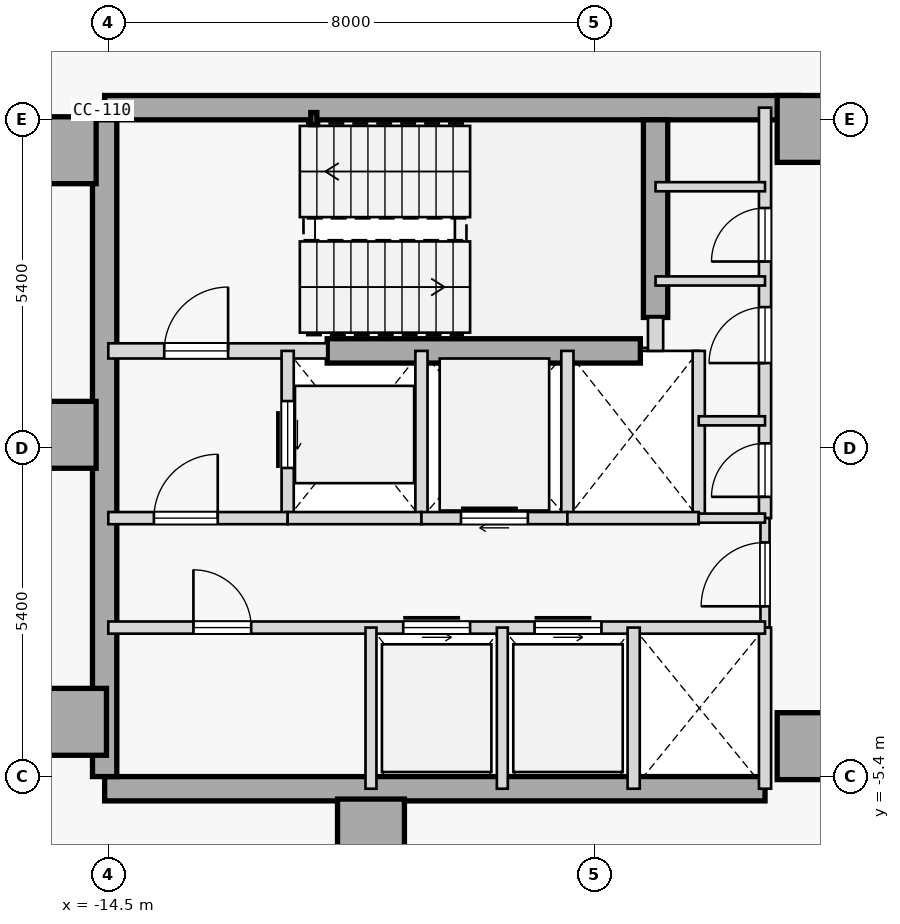
"""IFC4 building model, lengths in metres.
Left out: names, types, materials, properties, quantities, classifications, styles, units other than length and angle.
Written with IfcOpenShell. Run it as: python <this file> out.ifc"""

import sys

from ifc_helpers import new_model, si_unit, direction, frame, frame_2d, origin, origin_2d, place, context, subcontext, project, spatial, rectangle, hollow_rectangle, extrude, element, fill, save


model = new_model("IFC4")
c1 = context("Model", 3, precision=1e-05, world=origin(), true_north=direction((0.0, 1.0)))
c2 = subcontext(c1, "Body", "Model", "MODEL_VIEW")
j1 = project(units=[si_unit("LENGTHUNIT", "METRE"), si_unit("PLANEANGLEUNIT", "RADIAN")], contexts=[c1])
p1 = place(None, origin())
s1 = spatial("IfcSite", under=j1, at=p1, CompositionType="ELEMENT")
p2 = place(p1, origin())
s2 = spatial("IfcBuilding", under=s1, at=p2, CompositionType="ELEMENT")
p3 = place(p2, frame((0.0, 0.0, 87.4)))
s3 = spatial("IfcBuildingStorey", under=s2, at=p3, CompositionType="ELEMENT", Elevation=87.4)
for number, where, z_axis, x_axis in (
    (1, (-15.25, 4.9, 0.0), (0.0, 0.0, 1.0), (1.0, 0.0, 0.0)),
    (2, (-15.25, 0.22, 0.0), (0.0, 0.0, 1.0), (1.0, 0.0, 0.0)),
    (3, (-15.08, -4.5, 0.0), (0.0, 0.0, 1.0), (1.0, 0.0, 0.0)),
    (4, (-10.18, -6.32, 0.0), (0.0, 0.0, 1.0), (1.0, 0.0, 0.0)),
    (5, (-2.95, -4.9, 0.0), (0.0, 0.0, 1.0), (1.0, 0.0, 0.0)),
    (6, (-2.95, 5.25, 0.0), (0.0, 0.0, 1.0), (1.0, 0.0, 0.0)),
):
    element("IfcColumn", number, at=place(p3, frame(where, z_axis=z_axis, x_axis=x_axis)), inside=s3, PredefinedType="COLUMN", context=c2, shape_type="SweptSolid", body=[
        extrude(rectangle(XDim=1.1, YDim=1.1, at=origin_2d()), origin(), (0.0, 0.0, 1.0), 3.7),
    ])
p4 = place(p3, frame((-14.56, 5.6, 0.0), z_axis=(0.0, 0.0, 1.0), x_axis=(1.0, 0.0, 0.0)))
e7 = element("IfcWall", 7, at=p4, inside=s3, PredefinedType="SHEAR", context=c2, shape_type="SweptSolid", body=[
    extrude(rectangle(XDim=11.41, YDim=0.4, at=frame_2d((5.705, 0.0))), origin(), (0.0, 0.0, 1.0), 3.475),
])
p5 = place(p3, frame((-14.56, -5.6, 0.0), z_axis=(0.0, 0.0, 1.0), x_axis=(1.0, 0.0, 0.0)))
e8 = element("IfcWall", 8, at=p5, inside=s3, PredefinedType="SHEAR", context=c2, shape_type="SweptSolid", body=[
    extrude(rectangle(XDim=10.86, YDim=0.4, at=frame_2d((5.43, 0.0))), origin(), (0.0, 0.0, 1.0), 3.475),
])
p6 = place(p3, frame((-14.56, -5.4, 0.0), z_axis=(0.0, 0.0, 1.0), x_axis=(0.0, 1.0, 0.0)))
e9 = element("IfcWall", 9, at=p6, inside=s3, PredefinedType="SHEAR", context=c2, shape_type="SweptSolid", body=[
    extrude(rectangle(XDim=10.8, YDim=0.4, at=frame_2d((5.4, 0.0))), origin(), (0.0, 0.0, 1.0), 3.475),
])
p7 = place(p3, frame((-5.5, 2.15, 0.0), z_axis=(0.0, 0.0, 1.0), x_axis=(0.0, 1.0, 0.0)))
e10 = element("IfcWall", 10, at=p7, inside=s3, PredefinedType="SHEAR", context=c2, shape_type="SweptSolid", body=[
    extrude(rectangle(XDim=3.25, YDim=0.4, at=frame_2d((1.625, 0.0))), origin(), (0.0, 0.0, 1.0), 3.475),
])
p8 = place(p3, frame((-10.9, 1.6, 0.0), z_axis=(0.0, 0.0, 1.0), x_axis=(1.0, 0.0, 0.0)))
e11 = element("IfcWall", 11, at=p8, inside=s3, PredefinedType="SHEAR", context=c2, shape_type="SweptSolid", body=[
    extrude(rectangle(XDim=5.15, YDim=0.4, at=frame_2d((2.575, 0.0))), origin(), (0.0, 0.0, 1.0), 3.475),
])
p9 = place(p3, frame((-11.12, 5.42, 0.0), z_axis=(0.0, 0.0, 1.0), x_axis=(1.0, 0.0, 0.0)))
e12 = element("IfcColumn", 12, at=p9, inside=s3, PredefinedType="COLUMN", context=c2, shape_type="SweptSolid", body=[
    extrude(hollow_rectangle(XDim=0.1, YDim=0.2, WallThickness=0.008, at=origin_2d()), origin(), (0.0, 0.0, 1.0), 3.7),
])
p10 = place(p3, frame((-14.5, 1.6, 0.0), z_axis=(0.0, 0.0, 1.0), x_axis=(1.0, 0.0, 0.0)))
e13 = element("IfcWall", 13, at=p10, inside=s3, PredefinedType="STANDARD", context=c2, shape_type="SweptSolid", body=[
    extrude(rectangle(XDim=3.6, YDim=0.25, at=frame_2d((1.8, 0.0))), origin(), (0.0, 0.0, 1.0), 3.475),
])
p11 = place(p10, frame((0.92, 0.0, 0.0)))
e14 = element("IfcOpeningElement", 14, at=p11, cuts=e13, PredefinedType="OPENING", context=c2, shape_type="SweptSolid", body=[
    extrude(rectangle(XDim=1.05, YDim=2.15, at=frame_2d((0.525, 1.075))), frame((0.0, 0.135, 0.0), z_axis=(0.0, -1.0, 0.0), x_axis=(1.0, 0.0, 0.0)), (0.0, 0.0, 1.0), 0.27),
])
p12 = place(p3, frame((-5.5, 1.6, 0.0), z_axis=(0.0, 0.0, 1.0), x_axis=(0.0, 1.0, 0.0)))
e15 = element("IfcWall", 15, at=p12, inside=s3, PredefinedType="STANDARD", context=c2, shape_type="SweptSolid", body=[
    extrude(rectangle(XDim=0.55, YDim=0.25, at=frame_2d((0.275, 0.0))), origin(), (0.0, 0.0, 1.0), 3.475),
])
p13 = place(p3, frame((-3.7, -1.15, 0.0), z_axis=(0.0, 0.0, 1.0), x_axis=(0.0, 1.0, 0.0)))
e16 = element("IfcWall", 16, at=p13, inside=s3, PredefinedType="STANDARD", context=c2, shape_type="SweptSolid", body=[
    extrude(rectangle(XDim=6.75, YDim=0.2, at=frame_2d((3.375, 0.0))), origin(), (0.0, 0.0, 1.0), 3.475),
])
p14 = place(p13, frame((0.35, 0.0, 0.0)))
e17 = element("IfcOpeningElement", 17, at=p14, cuts=e16, PredefinedType="OPENING", context=c2, shape_type="SweptSolid", body=[
    extrude(rectangle(XDim=0.88, YDim=2.15, at=frame_2d((0.44, 1.075))), frame((0.0, 0.11, 0.0), z_axis=(0.0, -1.0, 0.0), x_axis=(1.0, 0.0, 0.0)), (0.0, 0.0, 1.0), 0.22),
])
p15 = place(p13, frame((2.55, 0.0, 0.0)))
e18 = element("IfcOpeningElement", 18, at=p15, cuts=e16, PredefinedType="OPENING", context=c2, shape_type="SweptSolid", body=[
    extrude(rectangle(XDim=0.92, YDim=2.15, at=frame_2d((0.46, 1.075))), frame((0.0, 0.11, 0.0), z_axis=(0.0, -1.0, 0.0), x_axis=(1.0, 0.0, 0.0)), (0.0, 0.0, 1.0), 0.22),
])
p16 = place(p13, frame((4.22, 0.0, 0.0)))
e19 = element("IfcOpeningElement", 19, at=p16, cuts=e16, PredefinedType="OPENING", context=c2, shape_type="SweptSolid", body=[
    extrude(rectangle(XDim=0.88, YDim=2.15, at=frame_2d((0.44, 1.075))), frame((0.0, 0.11, 0.0), z_axis=(0.0, -1.0, 0.0), x_axis=(1.0, 0.0, 0.0)), (0.0, 0.0, 1.0), 0.22),
])
p17 = place(p3, frame((-3.7, -2.95, 0.0), z_axis=(0.0, 0.0, 1.0), x_axis=(0.0, 1.0, 0.0)))
e20 = element("IfcWall", 20, at=p17, inside=s3, PredefinedType="PARTITIONING", context=c2, shape_type="SweptSolid", body=[
    extrude(rectangle(XDim=1.8, YDim=0.15, at=frame_2d((0.9, 0.0))), origin(), (0.0, 0.0, 1.0), 3.475),
])
p18 = place(p17, frame((0.35, 0.0, 0.0)))
e21 = element("IfcOpeningElement", 21, at=p18, cuts=e20, PredefinedType="OPENING", context=c2, shape_type="SweptSolid", body=[
    extrude(rectangle(XDim=1.05, YDim=2.18, at=frame_2d((0.525, 1.09))), frame((0.0, 0.085, 0.0), z_axis=(0.0, -1.0, 0.0), x_axis=(1.0, 0.0, 0.0)), (0.0, 0.0, 1.0), 0.17),
])
p19 = place(p3, frame((-3.7, -5.6, 0.0), z_axis=(0.0, 0.0, 1.0), x_axis=(0.0, 1.0, 0.0)))
e22 = element("IfcWall", 22, at=p19, inside=s3, PredefinedType="STANDARD", context=c2, shape_type="SweptSolid", body=[
    extrude(rectangle(XDim=2.65, YDim=0.2, at=frame_2d((1.325, 0.0))), origin(), (0.0, 0.0, 1.0), 3.475),
])
p20 = place(p3, frame((-11.55, -1.15, 0.0), z_axis=(0.0, 0.0, 1.0), x_axis=(0.0, 1.0, 0.0)))
e23 = element("IfcWall", 23, at=p20, inside=s3, PredefinedType="STANDARD", context=c2, shape_type="SweptSolid", body=[
    extrude(rectangle(XDim=2.75, YDim=0.2, at=frame_2d((1.375, 0.0))), origin(), (0.0, 0.0, 1.0), 3.475),
])
p21 = place(p20, frame((0.825, 0.0, 0.0)))
e24 = element("IfcOpeningElement", 24, at=p21, cuts=e23, PredefinedType="OPENING", context=c2, shape_type="SweptSolid", body=[
    extrude(rectangle(XDim=1.1, YDim=2.15, at=frame_2d((0.55, 1.075))), frame((0.0, 0.11, 0.0), z_axis=(0.0, -1.0, 0.0), x_axis=(1.0, 0.0, 0.0)), (0.0, 0.0, 1.0), 0.22),
])
p22 = place(p3, frame((-9.35, -1.15, 0.0), z_axis=(0.0, 0.0, 1.0), x_axis=(0.0, 1.0, 0.0)))
e25 = element("IfcWall", 25, at=p22, inside=s3, PredefinedType="STANDARD", context=c2, shape_type="SweptSolid", body=[
    extrude(rectangle(XDim=2.75, YDim=0.2, at=frame_2d((1.375, 0.0))), origin(), (0.0, 0.0, 1.0), 3.475),
])
p23 = place(p3, frame((-14.5, -1.15, 0.0), z_axis=(0.0, 0.0, 1.0), x_axis=(1.0, 0.0, 0.0)))
e26 = element("IfcWall", 26, at=p23, inside=s3, PredefinedType="STANDARD", context=c2, shape_type="SweptSolid", body=[
    extrude(rectangle(XDim=2.95, YDim=0.2, at=frame_2d((1.475, 0.0))), origin(), (0.0, 0.0, 1.0), 3.475),
])
p24 = place(p23, frame((0.75, 0.0, 0.0)))
e27 = element("IfcOpeningElement", 27, at=p24, cuts=e26, PredefinedType="OPENING", context=c2, shape_type="SweptSolid", body=[
    extrude(rectangle(XDim=1.05, YDim=2.18, at=frame_2d((0.525, 1.09))), frame((0.0, 0.11, 0.0), z_axis=(0.0, -1.0, 0.0), x_axis=(1.0, 0.0, 0.0)), (0.0, 0.0, 1.0), 0.22),
])
p25 = place(p3, frame((-11.55, -1.15, 0.0), z_axis=(0.0, 0.0, 1.0), x_axis=(1.0, 0.0, 0.0)))
e28 = element("IfcWall", 28, at=p25, inside=s3, PredefinedType="STANDARD", context=c2, shape_type="SweptSolid", body=[
    extrude(rectangle(XDim=2.2, YDim=0.2, at=frame_2d((1.1, 0.0))), origin(), (0.0, 0.0, 1.0), 3.475),
])
p26 = place(p3, frame((-6.95, -1.15, 0.0), z_axis=(0.0, 0.0, 1.0), x_axis=(0.0, 1.0, 0.0)))
e29 = element("IfcWall", 29, at=p26, inside=s3, PredefinedType="STANDARD", context=c2, shape_type="SweptSolid", body=[
    extrude(rectangle(XDim=2.75, YDim=0.2, at=frame_2d((1.375, 0.0))), origin(), (0.0, 0.0, 1.0), 3.475),
])
p27 = place(p3, frame((-9.35, -1.15, 0.0), z_axis=(0.0, 0.0, 1.0), x_axis=(1.0, 0.0, 0.0)))
e30 = element("IfcWall", 30, at=p27, inside=s3, PredefinedType="STANDARD", context=c2, shape_type="SweptSolid", body=[
    extrude(rectangle(XDim=2.4, YDim=0.2, at=frame_2d((1.2, 0.0))), origin(), (0.0, 0.0, 1.0), 3.475),
])
p28 = place(p27, frame((0.65, 0.0, 0.0)))
e31 = element("IfcOpeningElement", 31, at=p28, cuts=e30, PredefinedType="OPENING", context=c2, shape_type="SweptSolid", body=[
    extrude(rectangle(XDim=1.1, YDim=2.15, at=frame_2d((0.55, 1.075))), frame((0.0, 0.11, 0.0), z_axis=(0.0, -1.0, 0.0), x_axis=(1.0, 0.0, 0.0)), (0.0, 0.0, 1.0), 0.22),
])
p29 = place(p3, frame((-4.79, -1.15, 0.0), z_axis=(0.0, 0.0, 1.0), x_axis=(0.0, 1.0, 0.0)))
e32 = element("IfcWall", 32, at=p29, inside=s3, PredefinedType="STANDARD", context=c2, shape_type="SweptSolid", body=[
    extrude(rectangle(XDim=2.75, YDim=0.2, at=frame_2d((1.375, 0.0))), origin(), (0.0, 0.0, 1.0), 3.475),
])
p30 = place(p3, frame((-6.95, -1.15, 0.0), z_axis=(0.0, 0.0, 1.0), x_axis=(1.0, 0.0, 0.0)))
e33 = element("IfcWall", 33, at=p30, inside=s3, PredefinedType="STANDARD", context=c2, shape_type="SweptSolid", body=[
    extrude(rectangle(XDim=2.16, YDim=0.2, at=frame_2d((1.08, 0.0))), origin(), (0.0, 0.0, 1.0), 3.475),
])
p31 = place(p3, frame((-4.79, -1.15, 0.0), z_axis=(0.0, 0.0, 1.0), x_axis=(1.0, 0.0, 0.0)))
e34 = element("IfcWall", 34, at=p31, inside=s3, PredefinedType="PARTITIONING", context=c2, shape_type="SweptSolid", body=[
    extrude(rectangle(XDim=1.09, YDim=0.15, at=frame_2d((0.545, 0.0))), origin(), (0.0, 0.0, 1.0), 3.475),
])
p32 = place(p3, frame((-14.5, -2.95, 0.0), z_axis=(0.0, 0.0, 1.0), x_axis=(1.0, 0.0, 0.0)))
e35 = element("IfcWall", 35, at=p32, inside=s3, PredefinedType="STANDARD", context=c2, shape_type="SweptSolid", body=[
    extrude(rectangle(XDim=10.8, YDim=0.2, at=frame_2d((5.4, 0.0))), origin(), (0.0, 0.0, 1.0), 3.475),
])
p33 = place(p32, frame((4.85, 0.0, 0.0)))
e36 = element("IfcOpeningElement", 36, at=p33, cuts=e35, PredefinedType="OPENING", context=c2, shape_type="SweptSolid", body=[
    extrude(rectangle(XDim=1.1, YDim=2.15, at=frame_2d((0.55, 1.075))), frame((0.0, 0.11, 0.0), z_axis=(0.0, -1.0, 0.0), x_axis=(1.0, 0.0, 0.0)), (0.0, 0.0, 1.0), 0.22),
])
p34 = place(p32, frame((7.01, 0.0, 0.0)))
e37 = element("IfcOpeningElement", 37, at=p34, cuts=e35, PredefinedType="OPENING", context=c2, shape_type="SweptSolid", body=[
    extrude(rectangle(XDim=1.1, YDim=2.15, at=frame_2d((0.55, 1.075))), frame((0.0, 0.11, 0.0), z_axis=(0.0, -1.0, 0.0), x_axis=(1.0, 0.0, 0.0)), (0.0, 0.0, 1.0), 0.22),
])
p35 = place(p32, frame((1.4, 0.0, 0.0)))
e38 = element("IfcOpeningElement", 38, at=p35, cuts=e35, PredefinedType="OPENING", context=c2, shape_type="SweptSolid", body=[
    extrude(rectangle(XDim=0.95, YDim=2.15, at=frame_2d((0.475, 1.075))), frame((0.0, 0.11, 0.0), z_axis=(0.0, -1.0, 0.0), x_axis=(1.0, 0.0, 0.0)), (0.0, 0.0, 1.0), 0.22),
])
p36 = place(p3, frame((-5.86, -5.6, 0.0), z_axis=(0.0, 0.0, 1.0), x_axis=(0.0, 1.0, 0.0)))
e39 = element("IfcWall", 39, at=p36, inside=s3, PredefinedType="STANDARD", context=c2, shape_type="SweptSolid", body=[
    extrude(rectangle(XDim=2.65, YDim=0.2, at=frame_2d((1.325, 0.0))), origin(), (0.0, 0.0, 1.0), 3.475),
])
for number, where, z_axis, x_axis in (
    (40, (-10.18, -5.6, 0.0), (0.0, 0.0, 1.0), (0.0, 1.0, 0.0)),
    (41, (-8.02, -5.6, 0.0), (0.0, 0.0, 1.0), (0.0, 1.0, 0.0)),
):
    element("IfcWall", number, at=place(p3, frame(where, z_axis=z_axis, x_axis=x_axis)), inside=s3, PredefinedType="STANDARD", context=c2, shape_type="SweptSolid", body=[
        extrude(rectangle(XDim=2.65, YDim=0.18, at=frame_2d((1.325, 0.0))), origin(), (0.0, 0.0, 1.0), 3.475),
    ])
p37 = place(p3, frame((-5.5, 4.3, 0.0), z_axis=(0.0, 0.0, 1.0), x_axis=(1.0, 0.0, 0.0)))
e42 = element("IfcWall", 42, at=p37, inside=s3, PredefinedType="PARTITIONING", context=c2, shape_type="SweptSolid", body=[
    extrude(rectangle(XDim=1.8, YDim=0.15, at=frame_2d((0.9, 0.0))), origin(), (0.0, 0.0, 1.0), 3.475),
])
p38 = place(p3, frame((-4.79, 0.45, 0.0), z_axis=(0.0, 0.0, 1.0), x_axis=(1.0, 0.0, 0.0)))
e43 = element("IfcWall", 43, at=p38, inside=s3, PredefinedType="PARTITIONING", context=c2, shape_type="SweptSolid", body=[
    extrude(rectangle(XDim=1.09, YDim=0.15, at=frame_2d((0.545, 0.0))), origin(), (0.0, 0.0, 1.0), 3.475),
])
p39 = place(p3, frame((-5.5, 2.75, 0.0), z_axis=(0.0, 0.0, 1.0), x_axis=(1.0, 0.0, 0.0)))
e44 = element("IfcWall", 44, at=p39, inside=s3, PredefinedType="PARTITIONING", context=c2, shape_type="SweptSolid", body=[
    extrude(rectangle(XDim=1.8, YDim=0.15, at=frame_2d((0.9, 0.0))), origin(), (0.0, 0.0, 1.0), 3.475),
])
p40 = place(p11, origin())
e45 = element("IfcDoor", 45, at=p40, inside=s3, OperationType="SINGLE_SWING_RIGHT", PredefinedType="DOOR", context=c2, shape_type="SweptSolid", body=[
    extrude(rectangle(XDim=1.05, YDim=2.15, at=frame_2d((0.525, 1.075))), frame((0.0, 0.025, 0.0), z_axis=(0.0, -1.0, 0.0), x_axis=(1.0, 0.0, 0.0)), (0.0, 0.0, 1.0), 0.05),
])
fill(e14, e45)
p41 = place(p24, origin())
e46 = element("IfcDoor", 46, at=p41, inside=s3, OperationType="SINGLE_SWING_RIGHT", PredefinedType="DOOR", context=c2, shape_type="SweptSolid", body=[
    extrude(rectangle(XDim=1.05, YDim=2.18, at=frame_2d((0.525, 1.09))), frame((0.0, 0.025, 0.0), z_axis=(0.0, -1.0, 0.0), x_axis=(1.0, 0.0, 0.0)), (0.0, 0.0, 1.0), 0.05),
])
fill(e27, e46)
p42 = place(p18, origin())
e47 = element("IfcDoor", 47, at=p42, inside=s3, OperationType="SINGLE_SWING_LEFT", PredefinedType="DOOR", context=c2, shape_type="SweptSolid", body=[
    extrude(rectangle(XDim=1.05, YDim=2.18, at=frame_2d((0.525, 1.09))), frame((0.0, 0.025, 0.0), z_axis=(0.0, -1.0, 0.0), x_axis=(1.0, 0.0, 0.0)), (0.0, 0.0, 1.0), 0.05),
])
fill(e21, e47)
p43 = place(p21, origin())
e48 = element("IfcDoor", 48, at=p43, inside=s3, OperationType="SLIDING_TO_RIGHT", PredefinedType="DOOR", context=c2, shape_type="SweptSolid", body=[
    extrude(rectangle(XDim=1.1, YDim=2.15, at=frame_2d((0.55, 1.075))), frame((0.0, 0.025, 0.0), z_axis=(0.0, -1.0, 0.0), x_axis=(1.0, 0.0, 0.0)), (0.0, 0.0, 1.0), 0.05),
])
fill(e24, e48)
p44 = place(p28, origin())
e49 = element("IfcDoor", 49, at=p44, inside=s3, OperationType="SLIDING_TO_RIGHT", PredefinedType="DOOR", context=c2, shape_type="SweptSolid", body=[
    extrude(rectangle(XDim=1.1, YDim=2.15, at=frame_2d((0.55, 1.075))), frame((0.0, 0.025, 0.0), z_axis=(0.0, -1.0, 0.0), x_axis=(1.0, 0.0, 0.0)), (0.0, 0.0, 1.0), 0.05),
])
fill(e31, e49)
p45 = place(p33, origin())
e50 = element("IfcDoor", 50, at=p45, inside=s3, OperationType="SLIDING_TO_LEFT", PredefinedType="DOOR", context=c2, shape_type="SweptSolid", body=[
    extrude(rectangle(XDim=1.1, YDim=2.15, at=frame_2d((0.55, 1.075))), frame((0.0, 0.025, 0.0), z_axis=(0.0, -1.0, 0.0), x_axis=(1.0, 0.0, 0.0)), (0.0, 0.0, 1.0), 0.05),
])
fill(e36, e50)
p46 = place(p34, origin())
e51 = element("IfcDoor", 51, at=p46, inside=s3, OperationType="SLIDING_TO_LEFT", PredefinedType="DOOR", context=c2, shape_type="SweptSolid", body=[
    extrude(rectangle(XDim=1.1, YDim=2.15, at=frame_2d((0.55, 1.075))), frame((0.0, 0.025, 0.0), z_axis=(0.0, -1.0, 0.0), x_axis=(1.0, 0.0, 0.0)), (0.0, 0.0, 1.0), 0.05),
])
fill(e37, e51)
p47 = place(p35, origin())
e52 = element("IfcDoor", 52, at=p47, inside=s3, OperationType="SINGLE_SWING_LEFT", PredefinedType="DOOR", context=c2, shape_type="SweptSolid", body=[
    extrude(rectangle(XDim=0.95, YDim=2.15, at=frame_2d((0.475, 1.075))), frame((0.0, 0.025, 0.0), z_axis=(0.0, -1.0, 0.0), x_axis=(1.0, 0.0, 0.0)), (0.0, 0.0, 1.0), 0.05),
])
fill(e38, e52)
p48 = place(p14, origin())
e53 = element("IfcDoor", 53, at=p48, inside=s3, OperationType="SINGLE_SWING_LEFT", PredefinedType="DOOR", context=c2, shape_type="SweptSolid", body=[
    extrude(rectangle(XDim=0.88, YDim=2.15, at=frame_2d((0.44, 1.075))), frame((0.0, 0.025, 0.0), z_axis=(0.0, -1.0, 0.0), x_axis=(1.0, 0.0, 0.0)), (0.0, 0.0, 1.0), 0.05),
])
fill(e17, e53)
p49 = place(p15, origin())
e54 = element("IfcDoor", 54, at=p49, inside=s3, OperationType="SINGLE_SWING_LEFT", PredefinedType="DOOR", context=c2, shape_type="SweptSolid", body=[
    extrude(rectangle(XDim=0.92, YDim=2.15, at=frame_2d((0.46, 1.075))), frame((0.0, 0.025, 0.0), z_axis=(0.0, -1.0, 0.0), x_axis=(1.0, 0.0, 0.0)), (0.0, 0.0, 1.0), 0.05),
])
fill(e18, e54)
p50 = place(p16, origin())
e55 = element("IfcDoor", 55, at=p50, inside=s3, OperationType="SINGLE_SWING_LEFT", PredefinedType="DOOR", context=c2, shape_type="SweptSolid", body=[
    extrude(rectangle(XDim=0.88, YDim=2.15, at=frame_2d((0.44, 1.075))), frame((0.0, 0.025, 0.0), z_axis=(0.0, -1.0, 0.0), x_axis=(1.0, 0.0, 0.0)), (0.0, 0.0, 1.0), 0.05),
])
fill(e19, e55)
save(model, sys.argv[1])
